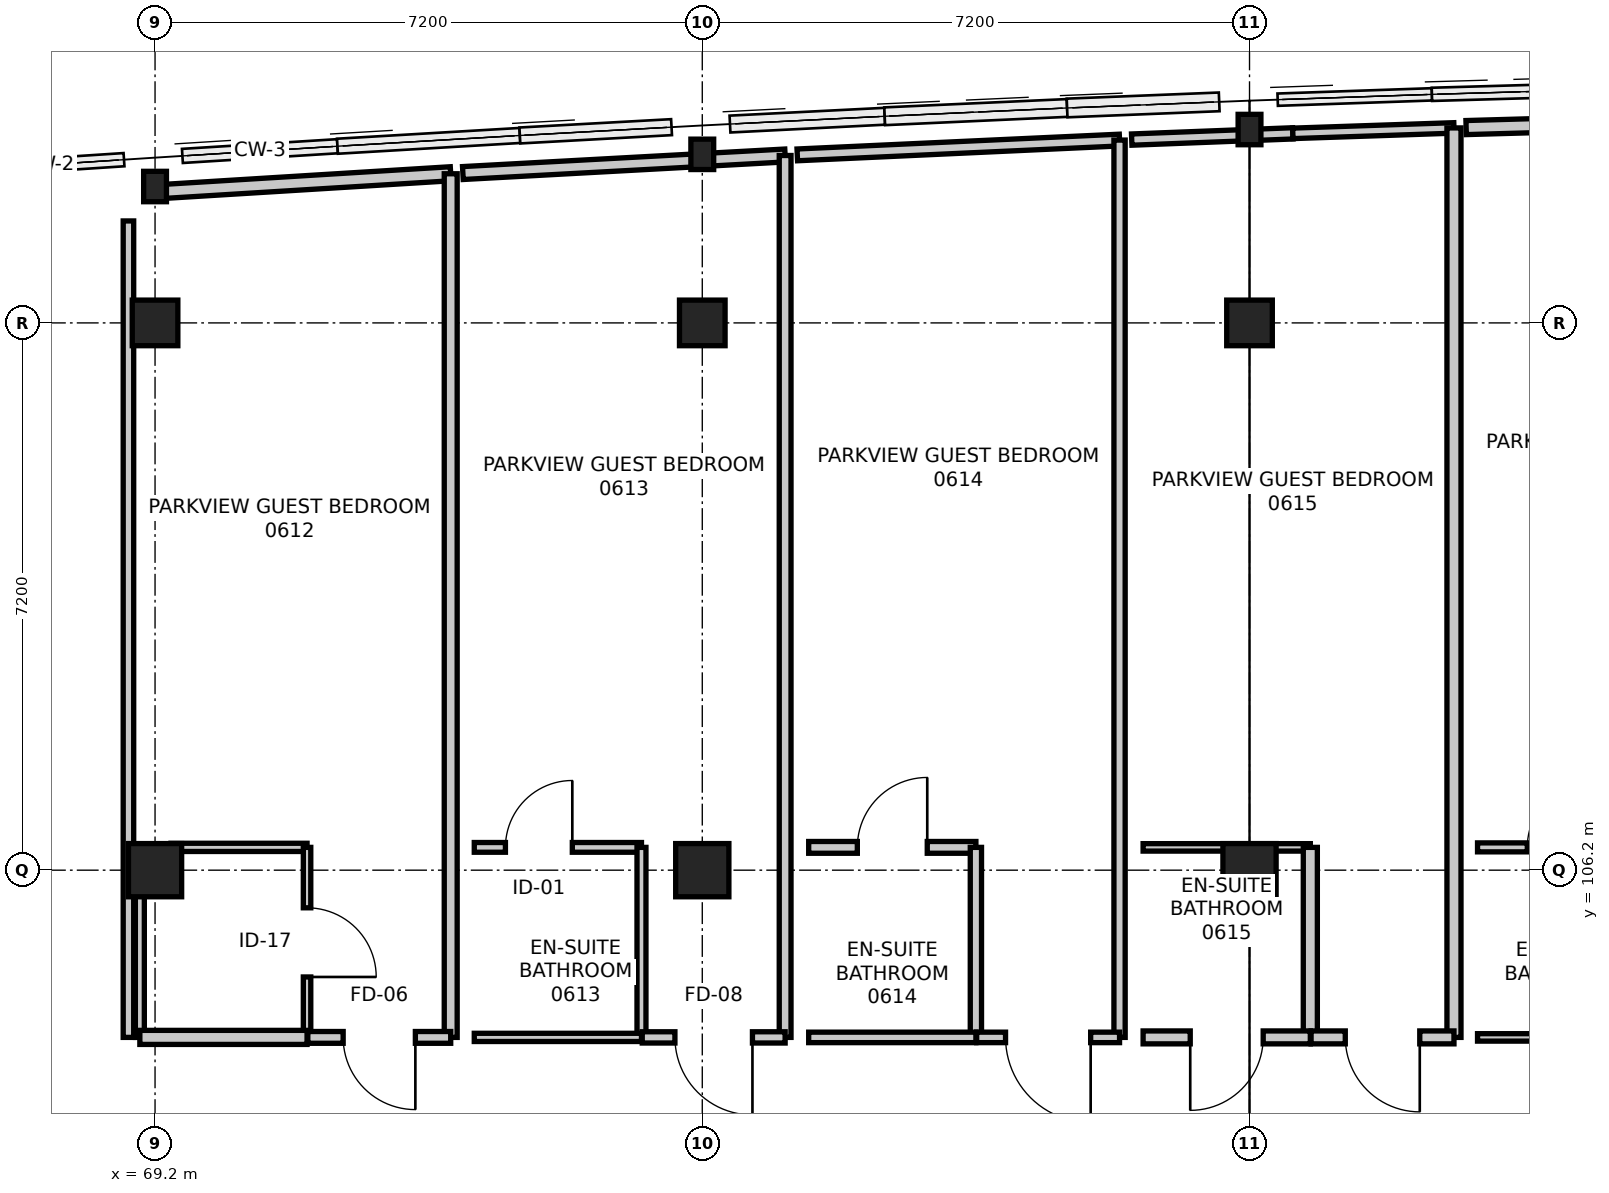
"""IFC4 building model, lengths in metres.
Left out: names, types, materials, properties, quantities, classifications, styles, units other than length and angle.
Written with IfcOpenShell. Run it as: python <this file> out.ifc"""

import sys

from ifc_helpers import new_model, si_unit, direction, frame, frame_2d, origin, origin_2d, place, context, subcontext, project, spatial, rectangle, i_section, extrude, element, fill, save


model = new_model("IFC4")
c1 = context("Model", 3, precision=1e-05, world=origin(), true_north=direction((0.0, 1.0)))
c2 = subcontext(c1, "Body", "Model", "MODEL_VIEW")
j1 = project(units=[si_unit("LENGTHUNIT", "METRE"), si_unit("PLANEANGLEUNIT", "RADIAN")], contexts=[c1])
p1 = place(None, origin())
s1 = spatial("IfcSite", under=j1, at=p1, CompositionType="ELEMENT")
p2 = place(p1, origin())
s2 = spatial("IfcBuilding", under=s1, at=p2, CompositionType="ELEMENT")
p3 = place(p2, frame((0.0, 0.0, 26.4)))
s3 = spatial("IfcBuildingStorey", under=s2, at=p3, CompositionType="ELEMENT", Elevation=26.4)
p4 = place(p3, frame((69.2, 106.2, 0.0), z_axis=(0.0, 0.0, 1.0), x_axis=(1.0, 0.0, 0.0)))
e1 = element("IfcColumn", 1, at=p4, inside=s3, PredefinedType="COLUMN", context=c2, shape_type="SweptSolid", body=[
    extrude(rectangle(XDim=0.7, YDim=0.7, at=origin_2d()), origin(), (0.0, 0.0, 1.0), 3.6),
])
p5 = place(p3, frame((69.2, 113.4, 0.0), z_axis=(0.0, 0.0, 1.0), x_axis=(1.0, 0.0, 0.0)))
e2 = element("IfcColumn", 2, at=p5, inside=s3, PredefinedType="COLUMN", context=c2, shape_type="SweptSolid", body=[
    extrude(rectangle(XDim=0.6, YDim=0.6, at=origin_2d()), origin(), (0.0, 0.0, 1.0), 3.6),
])
p6 = place(p3, frame((69.2, 115.194, 0.0), z_axis=(0.0, 0.0, 1.0), x_axis=(1.0, 0.0, 0.0)))
e3 = element("IfcColumn", 3, at=p6, inside=s3, PredefinedType="COLUMN", context=c2, shape_type="SweptSolid", body=[
    extrude(i_section(OverallWidth=0.3, OverallDepth=0.4, WebThickness=0.013, FlangeThickness=0.024, FilletRadius=0.027, at=origin_2d()), origin(), (0.0, 0.0, 1.0), 3.6),
])
p7 = place(p3, frame((76.4, 106.2, 0.0), z_axis=(0.0, 0.0, 1.0), x_axis=(1.0, 0.0, 0.0)))
e4 = element("IfcColumn", 4, at=p7, inside=s3, PredefinedType="COLUMN", context=c2, shape_type="SweptSolid", body=[
    extrude(rectangle(XDim=0.7, YDim=0.7, at=origin_2d()), origin(), (0.0, 0.0, 1.0), 3.6),
])
p8 = place(p3, frame((76.4, 113.4, 0.0), z_axis=(0.0, 0.0, 1.0), x_axis=(1.0, 0.0, 0.0)))
e5 = element("IfcColumn", 5, at=p8, inside=s3, PredefinedType="COLUMN", context=c2, shape_type="SweptSolid", body=[
    extrude(rectangle(XDim=0.6, YDim=0.6, at=origin_2d()), origin(), (0.0, 0.0, 1.0), 3.6),
])
p9 = place(p3, frame((76.4, 115.618, 0.0), z_axis=(0.0, 0.0, 1.0), x_axis=(1.0, 0.0, 0.0)))
e6 = element("IfcColumn", 6, at=p9, inside=s3, PredefinedType="COLUMN", context=c2, shape_type="SweptSolid", body=[
    extrude(i_section(OverallWidth=0.3, OverallDepth=0.4, WebThickness=0.013, FlangeThickness=0.024, FilletRadius=0.027, at=origin_2d()), origin(), (0.0, 0.0, 1.0), 3.6),
])
p10 = place(p3, frame((83.6, 106.2, 0.0), z_axis=(0.0, 0.0, 1.0), x_axis=(1.0, 0.0, 0.0)))
e7 = element("IfcColumn", 7, at=p10, inside=s3, PredefinedType="COLUMN", context=c2, shape_type="SweptSolid", body=[
    extrude(rectangle(XDim=0.7, YDim=0.7, at=origin_2d()), origin(), (0.0, 0.0, 1.0), 3.6),
])
p11 = place(p3, frame((83.6, 113.4, 0.0), z_axis=(0.0, 0.0, 1.0), x_axis=(1.0, 0.0, 0.0)))
e8 = element("IfcColumn", 8, at=p11, inside=s3, PredefinedType="COLUMN", context=c2, shape_type="SweptSolid", body=[
    extrude(rectangle(XDim=0.6, YDim=0.6, at=origin_2d()), origin(), (0.0, 0.0, 1.0), 3.6),
])
p12 = place(p3, frame((83.6, 115.944, 0.0), z_axis=(0.0, 0.0, 1.0), x_axis=(1.0, 0.0, 0.0)))
e9 = element("IfcColumn", 9, at=p12, inside=s3, PredefinedType="COLUMN", context=c2, shape_type="SweptSolid", body=[
    extrude(i_section(OverallWidth=0.3, OverallDepth=0.4, WebThickness=0.013, FlangeThickness=0.024, FilletRadius=0.027, at=origin_2d()), origin(), (0.0, 0.0, 1.0), 3.6),
])
p13 = place(p3, frame((69.0, 104.0, 0.0), z_axis=(0.0, 0.0, 1.0), x_axis=(0.0, 1.0, 0.0)))
e10 = element("IfcWall", 10, at=p13, inside=s3, PredefinedType="PARTITIONING", context=c2, shape_type="SweptSolid", body=[
    extrude(rectangle(XDim=2.09, YDim=0.118, at=frame_2d((1.045, 0.0))), origin(), (0.0, 0.0, 1.0), 2.685),
])
p14 = place(p3, frame((69.41, 106.5, 0.0), z_axis=(0.0, 0.0, 1.0), x_axis=(1.0, 0.0, 0.0)))
e11 = element("IfcWall", 11, at=p14, inside=s3, PredefinedType="PARTITIONING", context=c2, shape_type="SweptSolid", body=[
    extrude(rectangle(XDim=1.79, YDim=0.108, at=frame_2d((0.895, 0.0))), origin(), (0.0, 0.0, 1.0), 3.35),
])
p15 = place(p3, frame((71.2, 106.5, 0.0), z_axis=(0.0, 0.0, 1.0), x_axis=(0.0, -1.0, 0.0)))
e12 = element("IfcWall", 12, at=p15, inside=s3, PredefinedType="PARTITIONING", context=c2, shape_type="SweptSolid", body=[
    extrude(rectangle(XDim=2.5, YDim=0.098, at=frame_2d((1.25, 0.0))), origin(), (0.0, 0.0, 1.0), 2.735),
])
p16 = place(p15, frame((0.795, 0.0, 0.0)))
e13 = element("IfcOpeningElement", 13, at=p16, cuts=e12, PredefinedType="OPENING", context=c2, shape_type="SweptSolid", body=[
    extrude(rectangle(XDim=0.91, YDim=2.11, at=frame_2d((0.455, 1.055))), frame((0.0, 0.059, 0.0), z_axis=(0.0, -1.0, 0.0), x_axis=(1.0, 0.0, 0.0)), (0.0, 0.0, 1.0), 0.118),
])
p17 = place(p3, frame((71.2, 104.0, 0.0), z_axis=(0.0, 0.0, 1.0), x_axis=(-1.0, 0.0, 0.0)))
e14 = element("IfcWall", 14, at=p17, inside=s3, PredefinedType="PARTITIONING", context=c2, shape_type="SweptSolid", body=[
    extrude(rectangle(XDim=2.2, YDim=0.185, at=frame_2d((1.1, 0.0))), origin(), (0.0, 0.0, 1.0), 2.685),
])
p18 = place(p3, frame((68.85, 104.0, 0.0), z_axis=(0.0, 0.0, 1.0), x_axis=(0.0, 1.0, 0.0)))
e15 = element("IfcWall", 15, at=p18, inside=s3, PredefinedType="PARTITIONING", context=c2, shape_type="SweptSolid", body=[
    extrude(rectangle(XDim=10.741, YDim=0.138, at=frame_2d((5.371, 0.0))), origin(), (0.0, 0.0, 1.0), 2.735),
])
p19 = place(p3, frame((69.209, 115.124, 0.0), z_axis=(0.0, 0.0, 1.0), x_axis=(0.998116545587, 0.061346242139, 0.0)))
e16 = element("IfcWall", 16, at=p19, inside=s3, PredefinedType="PARTITIONING", context=c2, shape_type="SweptSolid", body=[
    extrude(rectangle(XDim=3.888, YDim=0.185, at=frame_2d((1.944, 0.0))), origin(), (0.0, 0.0, 1.0), 2.926),
])
p20 = place(p3, frame((73.09, 115.362, 0.0), z_axis=(0.0, 0.0, 1.0), x_axis=(0.0, -1.0, 0.0)))
e17 = element("IfcWall", 17, at=p20, inside=s3, PredefinedType="PARTITIONING", context=c2, shape_type="SweptSolid", body=[
    extrude(rectangle(XDim=11.362, YDim=0.17, at=frame_2d((5.681, 0.0))), origin(), (0.0, 0.0, 1.0), 2.735),
])
p21 = place(p3, frame((73.09, 104.0, 0.0), z_axis=(0.0, 0.0, 1.0), x_axis=(-1.0, 0.0, 0.0)))
e18 = element("IfcWall", 18, at=p21, inside=s3, PredefinedType="PARTITIONING", context=c2, shape_type="SweptSolid", body=[
    extrude(rectangle(XDim=1.88, YDim=0.155, at=frame_2d((0.94, 0.0))), origin(), (0.0, 0.0, 1.0), 3.35),
])
p22 = place(p21, frame((0.465, 0.0, 0.0)))
e19 = element("IfcOpeningElement", 19, at=p22, cuts=e18, PredefinedType="OPENING", context=c2, shape_type="SweptSolid", body=[
    extrude(rectangle(XDim=0.95, YDim=2.1, at=frame_2d((0.475, 1.05))), frame((0.0, 0.087, 0.0), z_axis=(0.0, -1.0, 0.0), x_axis=(1.0, 0.0, 0.0)), (0.0, 0.0, 1.0), 0.175),
])
p23 = place(p3, frame((73.4, 106.5, 0.0), z_axis=(0.0, 0.0, 1.0), x_axis=(1.0, 0.0, 0.0)))
e20 = element("IfcWall", 20, at=p23, inside=s3, PredefinedType="PARTITIONING", context=c2, shape_type="SweptSolid", body=[
    extrude(rectangle(XDim=2.2, YDim=0.128, at=frame_2d((1.1, 0.0))), origin(), (0.0, 0.0, 1.0), 3.35),
])
p24 = place(p23, frame((0.41, 0.0, 0.0)))
e21 = element("IfcOpeningElement", 21, at=p24, cuts=e20, PredefinedType="OPENING", context=c2, shape_type="SweptSolid", body=[
    extrude(rectangle(XDim=0.88, YDim=2.06, at=frame_2d((0.44, 1.03))), frame((0.0, 0.074, 0.0), z_axis=(0.0, -1.0, 0.0), x_axis=(1.0, 0.0, 0.0)), (0.0, 0.0, 1.0), 0.148),
])
p25 = place(p3, frame((75.6, 106.5, 0.0), z_axis=(0.0, 0.0, 1.0), x_axis=(0.0, -1.0, 0.0)))
e22 = element("IfcWall", 22, at=p25, inside=s3, PredefinedType="PARTITIONING", context=c2, shape_type="SweptSolid", body=[
    extrude(rectangle(XDim=2.5, YDim=0.118, at=frame_2d((1.25, 0.0))), origin(), (0.0, 0.0, 1.0), 2.735),
])
p26 = place(p3, frame((75.6, 104.0, 0.0), z_axis=(0.0, 0.0, 1.0), x_axis=(-1.0, 0.0, 0.0)))
e23 = element("IfcWall", 23, at=p26, inside=s3, PredefinedType="PARTITIONING", context=c2, shape_type="SweptSolid", body=[
    extrude(rectangle(XDim=2.2, YDim=0.108, at=frame_2d((1.1, 0.0))), origin(), (0.0, 0.0, 1.0), 3.35),
])
p27 = place(p3, frame((73.25, 115.372, 0.0), z_axis=(0.0, 0.0, 1.0), x_axis=(0.998519741604, 0.054390492057, 0.0)))
e24 = element("IfcWall", 24, at=p27, inside=s3, PredefinedType="PARTITIONING", context=c2, shape_type="SweptSolid", body=[
    extrude(rectangle(XDim=4.246, YDim=0.17, at=frame_2d((2.123, 0.0))), origin(), (0.0, 0.0, 1.0), 2.926),
])
p28 = place(p3, frame((77.49, 115.603, 0.0), z_axis=(0.0, 0.0, 1.0), x_axis=(0.0, -1.0, 0.0)))
e25 = element("IfcWall", 25, at=p28, inside=s3, PredefinedType="PARTITIONING", context=c2, shape_type="SweptSolid", body=[
    extrude(rectangle(XDim=11.603, YDim=0.155, at=frame_2d((5.801, 0.0))), origin(), (0.0, 0.0, 1.0), 2.735),
])
p29 = place(p3, frame((77.49, 104.0, 0.0), z_axis=(0.0, 0.0, 1.0), x_axis=(-1.0, 0.0, 0.0)))
e26 = element("IfcWall", 26, at=p29, inside=s3, PredefinedType="PARTITIONING", context=c2, shape_type="SweptSolid", body=[
    extrude(rectangle(XDim=1.88, YDim=0.148, at=frame_2d((0.94, 0.0))), origin(), (0.0, 0.0, 1.0), 2.685),
])
p30 = place(p29, frame((0.43, 0.0, 0.0)))
e27 = element("IfcOpeningElement", 27, at=p30, cuts=e26, PredefinedType="OPENING", context=c2, shape_type="SweptSolid", body=[
    extrude(rectangle(XDim=1.02, YDim=2.15, at=frame_2d((0.51, 1.075))), frame((0.0, 0.084, 0.0), z_axis=(0.0, -1.0, 0.0), x_axis=(1.0, 0.0, 0.0)), (0.0, 0.0, 1.0), 0.168),
])
p31 = place(p3, frame((77.8, 106.5, 0.0), z_axis=(0.0, 0.0, 1.0), x_axis=(1.0, 0.0, 0.0)))
e28 = element("IfcWall", 28, at=p31, inside=s3, PredefinedType="PARTITIONING", context=c2, shape_type="SweptSolid", body=[
    extrude(rectangle(XDim=2.2, YDim=0.155, at=frame_2d((1.1, 0.0))), origin(), (0.0, 0.0, 1.0), 3.35),
])
p32 = place(p31, frame((0.64, 0.0, 0.0)))
e29 = element("IfcOpeningElement", 29, at=p32, cuts=e28, PredefinedType="OPENING", context=c2, shape_type="SweptSolid", body=[
    extrude(rectangle(XDim=0.92, YDim=2.1, at=frame_2d((0.46, 1.05))), frame((0.0, 0.087, 0.0), z_axis=(0.0, -1.0, 0.0), x_axis=(1.0, 0.0, 0.0)), (0.0, 0.0, 1.0), 0.175),
])
p33 = place(p3, frame((80.0, 106.5, 0.0), z_axis=(0.0, 0.0, 1.0), x_axis=(0.0, -1.0, 0.0)))
e30 = element("IfcWall", 30, at=p33, inside=s3, PredefinedType="PARTITIONING", context=c2, shape_type="SweptSolid", body=[
    extrude(rectangle(XDim=2.5, YDim=0.148, at=frame_2d((1.25, 0.0))), origin(), (0.0, 0.0, 1.0), 2.735),
])
p34 = place(p3, frame((80.0, 104.0, 0.0), z_axis=(0.0, 0.0, 1.0), x_axis=(-1.0, 0.0, 0.0)))
e31 = element("IfcWall", 31, at=p34, inside=s3, PredefinedType="PARTITIONING", context=c2, shape_type="SweptSolid", body=[
    extrude(rectangle(XDim=2.2, YDim=0.138, at=frame_2d((1.1, 0.0))), origin(), (0.0, 0.0, 1.0), 3.35),
])
p35 = place(p3, frame((77.65, 115.611, 0.0), z_axis=(0.0, 0.0, 1.0), x_axis=(0.998946003573, 0.045900783719, 0.0)))
e32 = element("IfcWall", 32, at=p35, inside=s3, PredefinedType="PARTITIONING", context=c2, shape_type="SweptSolid", body=[
    extrude(rectangle(XDim=4.244, YDim=0.155, at=frame_2d((2.122, 0.0))), origin(), (0.0, 0.0, 1.0), 2.926),
])
p36 = place(p3, frame((81.89, 115.805, 0.0), z_axis=(0.0, 0.0, 1.0), x_axis=(0.0, -1.0, 0.0)))
e33 = element("IfcWall", 33, at=p36, inside=s3, PredefinedType="PARTITIONING", context=c2, shape_type="SweptSolid", body=[
    extrude(rectangle(XDim=11.805, YDim=0.148, at=frame_2d((5.903, 0.0))), origin(), (0.0, 0.0, 1.0), 2.735),
])
p37 = place(p3, frame((81.89, 104.0, 0.0), z_axis=(0.0, 0.0, 1.0), x_axis=(-1.0, 0.0, 0.0)))
e34 = element("IfcWall", 34, at=p37, inside=s3, PredefinedType="PARTITIONING", context=c2, shape_type="SweptSolid", body=[
    extrude(rectangle(XDim=1.88, YDim=0.138, at=frame_2d((0.94, 0.0))), origin(), (0.0, 0.0, 1.0), 3.35),
])
p38 = place(p37, frame((0.38, 0.0, 0.0)))
e35 = element("IfcOpeningElement", 35, at=p38, cuts=e34, PredefinedType="OPENING", context=c2, shape_type="SweptSolid", body=[
    extrude(rectangle(XDim=1.12, YDim=2.2, at=frame_2d((0.56, 1.1))), frame((0.0, 0.079, 0.0), z_axis=(0.0, -1.0, 0.0), x_axis=(1.0, 0.0, 0.0)), (0.0, 0.0, 1.0), 0.158),
])
p39 = place(p3, frame((82.2, 106.5, 0.0), z_axis=(0.0, 0.0, 1.0), x_axis=(1.0, 0.0, 0.0)))
e36 = element("IfcWall", 36, at=p39, inside=s3, PredefinedType="PARTITIONING", context=c2, shape_type="SweptSolid", body=[
    extrude(rectangle(XDim=2.2, YDim=0.098, at=frame_2d((1.1, 0.0))), origin(), (0.0, 0.0, 1.0), 2.685),
])
p40 = place(p3, frame((84.4, 106.5, 0.0), z_axis=(0.0, 0.0, 1.0), x_axis=(0.0, -1.0, 0.0)))
e37 = element("IfcWall", 37, at=p40, inside=s3, PredefinedType="PARTITIONING", context=c2, shape_type="SweptSolid", body=[
    extrude(rectangle(XDim=2.5, YDim=0.185, at=frame_2d((1.25, 0.0))), origin(), (0.0, 0.0, 1.0), 2.735),
])
p41 = place(p3, frame((84.4, 104.0, 0.0), z_axis=(0.0, 0.0, 1.0), x_axis=(-1.0, 0.0, 0.0)))
e38 = element("IfcWall", 38, at=p41, inside=s3, PredefinedType="PARTITIONING", context=c2, shape_type="SweptSolid", body=[
    extrude(rectangle(XDim=2.2, YDim=0.17, at=frame_2d((1.1, 0.0))), origin(), (0.0, 0.0, 1.0), 2.685),
])
p42 = place(p41, frame((0.62, 0.0, 0.0)))
e39 = element("IfcOpeningElement", 39, at=p42, cuts=e38, PredefinedType="OPENING", context=c2, shape_type="SweptSolid", body=[
    extrude(rectangle(XDim=0.96, YDim=2.14, at=frame_2d((0.48, 1.07))), frame((0.0, 0.095, 0.0), z_axis=(0.0, -1.0, 0.0), x_axis=(1.0, 0.0, 0.0)), (0.0, 0.0, 1.0), 0.19),
])
p43 = place(p3, frame((82.05, 115.812, 0.0), z_axis=(0.0, 0.0, 1.0), x_axis=(0.999252137846, 0.03866736362, 0.0)))
e40 = element("IfcWall", 40, at=p43, inside=s3, PredefinedType="PARTITIONING", context=c2, shape_type="SweptSolid", body=[
    extrude(rectangle(XDim=2.121, YDim=0.148, at=frame_2d((1.061, 0.0))), origin(), (0.0, 0.0, 1.0), 2.926),
])
p44 = place(p3, frame((84.17, 115.894, 0.0), z_axis=(0.0, 0.0, 1.0), x_axis=(0.999431284575, 0.033721023305, 0.0)))
e41 = element("IfcWall", 41, at=p44, inside=s3, PredefinedType="PARTITIONING", context=c2, shape_type="SweptSolid", body=[
    extrude(rectangle(XDim=2.121, YDim=0.138, at=frame_2d((1.061, 0.0))), origin(), (0.0, 0.0, 1.0), 2.926),
])
p45 = place(p3, frame((86.29, 115.965, 0.0), z_axis=(0.0, 0.0, 1.0), x_axis=(0.0, -1.0, 0.0)))
e42 = element("IfcWall", 42, at=p45, inside=s3, PredefinedType="PARTITIONING", context=c2, shape_type="SweptSolid", body=[
    extrude(rectangle(XDim=11.965, YDim=0.185, at=frame_2d((5.983, 0.0))), origin(), (0.0, 0.0, 1.0), 2.735),
])
p46 = place(p3, frame((86.29, 104.0, 0.0), z_axis=(0.0, 0.0, 1.0), x_axis=(-1.0, 0.0, 0.0)))
e43 = element("IfcWall", 43, at=p46, inside=s3, PredefinedType="PARTITIONING", context=c2, shape_type="SweptSolid", body=[
    extrude(rectangle(XDim=1.88, YDim=0.17, at=frame_2d((0.94, 0.0))), origin(), (0.0, 0.0, 1.0), 3.35),
])
p47 = place(p46, frame((0.45, 0.0, 0.0)))
e44 = element("IfcOpeningElement", 44, at=p47, cuts=e43, PredefinedType="OPENING", context=c2, shape_type="SweptSolid", body=[
    extrude(rectangle(XDim=0.98, YDim=2.15, at=frame_2d((0.49, 1.075))), frame((0.0, 0.095, 0.0), z_axis=(0.0, -1.0, 0.0), x_axis=(1.0, 0.0, 0.0)), (0.0, 0.0, 1.0), 0.19),
])
p48 = place(p3, frame((86.6, 106.5, 0.0), z_axis=(0.0, 0.0, 1.0), x_axis=(1.0, 0.0, 0.0)))
e45 = element("IfcWall", 45, at=p48, inside=s3, PredefinedType="PARTITIONING", context=c2, shape_type="SweptSolid", body=[
    extrude(rectangle(XDim=2.2, YDim=0.118, at=frame_2d((1.1, 0.0))), origin(), (0.0, 0.0, 1.0), 3.35),
])
p49 = place(p48, frame((0.655, 0.0, 0.0)))
e46 = element("IfcOpeningElement", 46, at=p49, cuts=e45, PredefinedType="OPENING", context=c2, shape_type="SweptSolid", body=[
    extrude(rectangle(XDim=0.89, YDim=2.09, at=frame_2d((0.445, 1.045))), frame((0.0, 0.069, 0.0), z_axis=(0.0, -1.0, 0.0), x_axis=(1.0, 0.0, 0.0)), (0.0, 0.0, 1.0), 0.138),
])
p50 = place(p3, frame((88.8, 104.0, 0.0), z_axis=(0.0, 0.0, 1.0), x_axis=(-1.0, 0.0, 0.0)))
e47 = element("IfcWall", 47, at=p50, inside=s3, PredefinedType="PARTITIONING", context=c2, shape_type="SweptSolid", body=[
    extrude(rectangle(XDim=2.2, YDim=0.098, at=frame_2d((1.1, 0.0))), origin(), (0.0, 0.0, 1.0), 3.35),
])
p51 = place(p3, frame((86.45, 115.97, 0.0), z_axis=(0.0, 0.0, 1.0), x_axis=(0.999602256239, 0.028201583692, 0.0)))
e48 = element("IfcWall", 48, at=p51, inside=s3, PredefinedType="PARTITIONING", context=c2, shape_type="SweptSolid", body=[
    extrude(rectangle(XDim=2.121, YDim=0.185, at=frame_2d((1.061, 0.0))), origin(), (0.0, 0.0, 1.0), 2.926),
])
p52 = place(p16, origin())
e49 = element("IfcDoor", 49, at=p52, inside=s3, OperationType="SINGLE_SWING_RIGHT", PredefinedType="DOOR", context=c2, shape_type="SweptSolid", body=[
    extrude(rectangle(XDim=0.91, YDim=2.11, at=frame_2d((0.455, 1.055))), frame((0.0, 0.025, 0.0), z_axis=(0.0, -1.0, 0.0), x_axis=(1.0, 0.0, 0.0)), (0.0, 0.0, 1.0), 0.05),
])
fill(e13, e49)
p53 = place(p22, origin())
e50 = element("IfcDoor", 50, at=p53, inside=s3, OperationType="SINGLE_SWING_LEFT", PredefinedType="DOOR", context=c2, shape_type="SweptSolid", body=[
    extrude(rectangle(XDim=0.95, YDim=2.1, at=frame_2d((0.475, 1.05))), frame((0.0, 0.025, 0.0), z_axis=(0.0, -1.0, 0.0), x_axis=(1.0, 0.0, 0.0)), (0.0, 0.0, 1.0), 0.05),
])
fill(e19, e50)
p54 = place(p24, origin())
e51 = element("IfcDoor", 51, at=p54, inside=s3, OperationType="SINGLE_SWING_RIGHT", PredefinedType="DOOR", context=c2, shape_type="SweptSolid", body=[
    extrude(rectangle(XDim=0.88, YDim=2.06, at=frame_2d((0.44, 1.03))), frame((0.0, 0.025, 0.0), z_axis=(0.0, -1.0, 0.0), x_axis=(1.0, 0.0, 0.0)), (0.0, 0.0, 1.0), 0.05),
])
fill(e21, e51)
p55 = place(p30, origin())
e52 = element("IfcDoor", 52, at=p55, inside=s3, OperationType="SINGLE_SWING_LEFT", PredefinedType="DOOR", context=c2, shape_type="SweptSolid", body=[
    extrude(rectangle(XDim=1.02, YDim=2.15, at=frame_2d((0.51, 1.075))), frame((0.0, 0.025, 0.0), z_axis=(0.0, -1.0, 0.0), x_axis=(1.0, 0.0, 0.0)), (0.0, 0.0, 1.0), 0.05),
])
fill(e27, e52)
p56 = place(p32, origin())
e53 = element("IfcDoor", 53, at=p56, inside=s3, OperationType="SINGLE_SWING_RIGHT", PredefinedType="DOOR", context=c2, shape_type="SweptSolid", body=[
    extrude(rectangle(XDim=0.92, YDim=2.1, at=frame_2d((0.46, 1.05))), frame((0.0, 0.025, 0.0), z_axis=(0.0, -1.0, 0.0), x_axis=(1.0, 0.0, 0.0)), (0.0, 0.0, 1.0), 0.05),
])
fill(e29, e53)
p57 = place(p38, origin())
e54 = element("IfcDoor", 54, at=p57, inside=s3, OperationType="SINGLE_SWING_LEFT", PredefinedType="DOOR", context=c2, shape_type="SweptSolid", body=[
    extrude(rectangle(XDim=1.12, YDim=2.2, at=frame_2d((0.56, 1.1))), frame((0.0, 0.025, 0.0), z_axis=(0.0, -1.0, 0.0), x_axis=(1.0, 0.0, 0.0)), (0.0, 0.0, 1.0), 0.05),
])
fill(e35, e54)
p58 = place(p42, origin())
e55 = element("IfcDoor", 55, at=p58, inside=s3, OperationType="SINGLE_SWING_RIGHT", PredefinedType="DOOR", context=c2, shape_type="SweptSolid", body=[
    extrude(rectangle(XDim=0.96, YDim=2.14, at=frame_2d((0.48, 1.07))), frame((0.0, 0.025, 0.0), z_axis=(0.0, -1.0, 0.0), x_axis=(1.0, 0.0, 0.0)), (0.0, 0.0, 1.0), 0.05),
])
fill(e39, e55)
p59 = place(p47, origin())
e56 = element("IfcDoor", 56, at=p59, inside=s3, OperationType="SINGLE_SWING_LEFT", PredefinedType="DOOR", context=c2, shape_type="SweptSolid", body=[
    extrude(rectangle(XDim=0.98, YDim=2.15, at=frame_2d((0.49, 1.075))), frame((0.0, 0.025, 0.0), z_axis=(0.0, -1.0, 0.0), x_axis=(1.0, 0.0, 0.0)), (0.0, 0.0, 1.0), 0.05),
])
fill(e44, e56)
p60 = place(p49, origin())
e57 = element("IfcDoor", 57, at=p60, inside=s3, OperationType="SINGLE_SWING_RIGHT", PredefinedType="DOOR", context=c2, shape_type="SweptSolid", body=[
    extrude(rectangle(XDim=0.89, YDim=2.09, at=frame_2d((0.445, 1.045))), frame((0.0, 0.025, 0.0), z_axis=(0.0, -1.0, 0.0), x_axis=(1.0, 0.0, 0.0)), (0.0, 0.0, 1.0), 0.05),
])
fill(e46, e57)
save(model, sys.argv[1])
